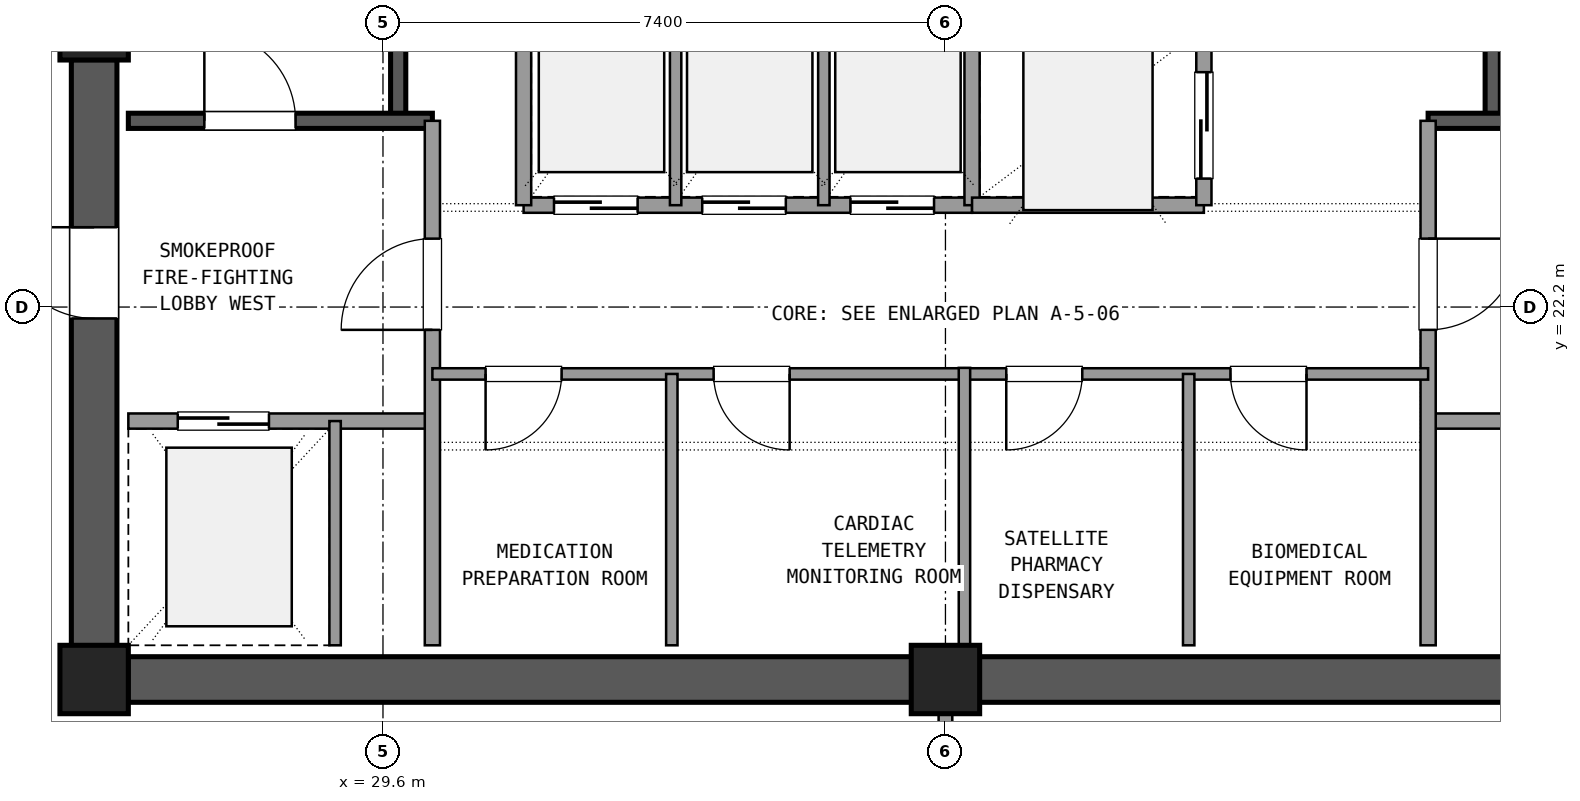
"""IFC4 building model, lengths in metres.
Left out: names, types, materials, properties, quantities, classifications, styles, units other than length and angle.
Written with IfcOpenShell. Run it as: python <this file> out.ifc"""

import sys

from ifc_helpers import new_model, si_unit, direction, frame, frame_2d, origin, origin_2d, place, context, subcontext, project, spatial, rectangle, extrude, element, fill, save


model = new_model("IFC4")
c1 = context("Model", 3, precision=1e-05, world=origin(), true_north=direction((0.0, 1.0)))
c2 = subcontext(c1, "Body", "Model", "MODEL_VIEW")
j1 = project(units=[si_unit("LENGTHUNIT", "METRE"), si_unit("PLANEANGLEUNIT", "RADIAN")], contexts=[c1])
p1 = place(None, origin())
s1 = spatial("IfcSite", under=j1, at=p1, CompositionType="ELEMENT")
p2 = place(p1, origin())
s2 = spatial("IfcBuilding", under=s1, at=p2, CompositionType="ELEMENT")
p3 = place(p2, frame((0.0, 0.0, 199.98)))
s3 = spatial("IfcBuildingStorey", under=s2, at=p3, CompositionType="ELEMENT", Elevation=199.98)
for number, where, z_axis, x_axis in (
    (1, (25.8, 17.3, 0.0), (0.0, 0.0, 1.0), (1.0, 0.0, 0.0)),
    (2, (37.0, 17.3, 0.0), (0.0, 0.0, 1.0), (1.0, 0.0, 0.0)),
    (3, (25.8, 25.9, 0.0), (0.0, 0.0, 1.0), (1.0, 0.0, 0.0)),
):
    element("IfcColumn", number, at=place(p3, frame(where, z_axis=z_axis, x_axis=x_axis)), inside=s3, PredefinedType="COLUMN", context=c2, shape_type="SweptSolid", body=[
        extrude(rectangle(XDim=0.9, YDim=0.9, at=origin_2d()), origin(), (0.0, 0.0, 1.0), 3.6),
    ])
for number, where, z_axis, x_axis in (
    (4, (26.245, 17.3, 0.0), (0.0, 0.0, 1.0), (1.0, 0.0, 0.0)),
    (5, (37.445, 17.3, 0.0), (0.0, 0.0, 1.0), (1.0, 0.0, 0.0)),
):
    element("IfcWall", number, at=place(p3, frame(where, z_axis=z_axis, x_axis=x_axis)), inside=s3, PredefinedType="SHEAR", context=c2, shape_type="SweptSolid", body=[
        extrude(rectangle(XDim=10.31, YDim=0.6, at=frame_2d((5.155, 0.0))), origin(), (0.0, 0.0, 1.0), 3.32),
    ])
p4 = place(p3, frame((25.8, 25.455, 0.0), z_axis=(0.0, 0.0, 1.0), x_axis=(0.0, -1.0, 0.0)))
e6 = element("IfcWall", 6, at=p4, inside=s3, PredefinedType="SHEAR", context=c2, shape_type="SweptSolid", body=[
    extrude(rectangle(XDim=7.71, YDim=0.6, at=frame_2d((3.855, 0.0))), origin(), (0.0, 0.0, 1.0), 3.32),
])
p5 = place(p4, frame((2.205, 0.0, 0.0)))
e7 = element("IfcOpeningElement", 7, at=p5, cuts=e6, PredefinedType="OPENING", context=c2, shape_type="SweptSolid", body=[
    extrude(rectangle(XDim=1.2, YDim=2.15, at=frame_2d((0.6, 1.075))), frame((0.0, 0.31, 0.0), z_axis=(0.0, -1.0, 0.0), x_axis=(1.0, 0.0, 0.0)), (0.0, 0.0, 1.0), 0.62),
])
p6 = place(p3, frame((29.8, 24.65, 0.0), z_axis=(0.0, 0.0, 1.0), x_axis=(0.0, 1.0, 0.0)))
e8 = element("IfcWall", 8, at=p6, inside=s3, PredefinedType="SHEAR", context=c2, shape_type="SweptSolid", body=[
    extrude(rectangle(XDim=9.4, YDim=0.2, at=frame_2d((4.7, 0.0))), origin(), (0.0, 0.0, 1.0), 3.32),
])
p7 = place(p3, frame((26.25, 24.65, 0.0), z_axis=(0.0, 0.0, 1.0), x_axis=(1.0, 0.0, 0.0)))
e9 = element("IfcWall", 9, at=p7, inside=s3, PredefinedType="SHEAR", context=c2, shape_type="SweptSolid", body=[
    extrude(rectangle(XDim=4.0, YDim=0.2, at=frame_2d((2.0, 0.0))), origin(), (0.0, 0.0, 1.0), 3.32),
])
p8 = place(p7, frame((1.0, 0.0, 0.0)))
e10 = element("IfcOpeningElement", 10, at=p8, cuts=e9, PredefinedType="OPENING", context=c2, shape_type="SweptSolid", body=[
    extrude(rectangle(XDim=1.2, YDim=2.15, at=frame_2d((0.6, 1.075))), frame((0.0, 0.11, 0.0), z_axis=(0.0, -1.0, 0.0), x_axis=(1.0, 0.0, 0.0)), (0.0, 0.0, 1.0), 0.22),
])
p9 = place(p3, frame((44.2, 24.65, 0.0), z_axis=(0.0, 0.0, 1.0), x_axis=(0.0, 1.0, 0.0)))
e11 = element("IfcWall", 11, at=p9, inside=s3, PredefinedType="SHEAR", context=c2, shape_type="SweptSolid", body=[
    extrude(rectangle(XDim=9.4, YDim=0.2, at=frame_2d((4.7, 0.0))), origin(), (0.0, 0.0, 1.0), 3.32),
])
p10 = place(p3, frame((43.35, 24.65, 0.0), z_axis=(0.0, 0.0, 1.0), x_axis=(1.0, 0.0, 0.0)))
e12 = element("IfcWall", 12, at=p10, inside=s3, PredefinedType="SHEAR", context=c2, shape_type="SweptSolid", body=[
    extrude(rectangle(XDim=4.4, YDim=0.2, at=frame_2d((2.2, 0.0))), origin(), (0.0, 0.0, 1.0), 3.32),
])
p11 = place(p10, frame((2.0, 0.0, 0.0)))
e13 = element("IfcOpeningElement", 13, at=p11, cuts=e12, PredefinedType="OPENING", context=c2, shape_type="SweptSolid", body=[
    extrude(rectangle(XDim=1.2, YDim=2.15, at=frame_2d((0.6, 1.075))), frame((0.0, 0.11, 0.0), z_axis=(0.0, -1.0, 0.0), x_axis=(1.0, 0.0, 0.0)), (0.0, 0.0, 1.0), 0.22),
])
p12 = place(p3, frame((26.25, 20.7, 0.0), z_axis=(0.0, 0.0, 1.0), x_axis=(1.0, 0.0, 0.0)))
e14 = element("IfcWall", 14, at=p12, inside=s3, PredefinedType="SOLIDWALL", context=c2, shape_type="SweptSolid", body=[
    extrude(rectangle(XDim=4.0, YDim=0.2, at=frame_2d((2.0, 0.0))), origin(), (0.0, 0.0, 1.0), 2.61),
])
p13 = place(p12, frame((0.65, 0.0, 0.0)))
e15 = element("IfcOpeningElement", 15, at=p13, cuts=e14, PredefinedType="OPENING", context=c2, shape_type="SweptSolid", body=[
    extrude(rectangle(XDim=1.2, YDim=2.15, at=frame_2d((0.6, 1.075))), frame((0.0, 0.11, 0.0), z_axis=(0.0, -1.0, 0.0), x_axis=(1.0, 0.0, 0.0)), (0.0, 0.0, 1.0), 0.22),
])
p14 = place(p3, frame((30.25, 17.75, 0.0), z_axis=(0.0, 0.0, 1.0), x_axis=(0.0, 1.0, 0.0)))
e16 = element("IfcWall", 16, at=p14, inside=s3, PredefinedType="SOLIDWALL", context=c2, shape_type="SweptSolid", body=[
    extrude(rectangle(XDim=6.9, YDim=0.2, at=frame_2d((3.45, 0.0))), origin(), (0.0, 0.0, 1.0), 2.61),
])
p15 = place(p14, frame((4.15, 0.0, 0.0)))
e17 = element("IfcOpeningElement", 17, at=p15, cuts=e16, PredefinedType="OPENING", context=c2, shape_type="SweptSolid", body=[
    extrude(rectangle(XDim=1.2, YDim=2.15, at=frame_2d((0.6, 1.075))), frame((0.0, 0.11, 0.0), z_axis=(0.0, -1.0, 0.0), x_axis=(1.0, 0.0, 0.0)), (0.0, 0.0, 1.0), 0.22),
])
p16 = place(p3, frame((28.97, 17.75, 0.0), z_axis=(0.0, 0.0, 1.0), x_axis=(0.0, 1.0, 0.0)))
e18 = element("IfcWall", 18, at=p16, inside=s3, PredefinedType="PARTITIONING", context=c2, shape_type="SweptSolid", body=[
    extrude(rectangle(XDim=2.95, YDim=0.15, at=frame_2d((1.475, 0.0))), origin(), (0.0, 0.0, 1.0), 2.61),
])
p17 = place(p3, frame((43.35, 20.7, 0.0), z_axis=(0.0, 0.0, 1.0), x_axis=(1.0, 0.0, 0.0)))
e19 = element("IfcWall", 19, at=p17, inside=s3, PredefinedType="SOLIDWALL", context=c2, shape_type="SweptSolid", body=[
    extrude(rectangle(XDim=4.4, YDim=0.2, at=frame_2d((2.2, 0.0))), origin(), (0.0, 0.0, 1.0), 2.61),
])
p18 = place(p17, frame((2.35, 0.0, 0.0)))
e20 = element("IfcOpeningElement", 20, at=p18, cuts=e19, PredefinedType="OPENING", context=c2, shape_type="SweptSolid", body=[
    extrude(rectangle(XDim=1.2, YDim=2.15, at=frame_2d((0.6, 1.075))), frame((0.0, 0.11, 0.0), z_axis=(0.0, -1.0, 0.0), x_axis=(1.0, 0.0, 0.0)), (0.0, 0.0, 1.0), 0.22),
])
p19 = place(p3, frame((43.35, 17.75, 0.0), z_axis=(0.0, 0.0, 1.0), x_axis=(0.0, 1.0, 0.0)))
e21 = element("IfcWall", 21, at=p19, inside=s3, PredefinedType="SOLIDWALL", context=c2, shape_type="SweptSolid", body=[
    extrude(rectangle(XDim=6.9, YDim=0.2, at=frame_2d((3.45, 0.0))), origin(), (0.0, 0.0, 1.0), 2.61),
])
p20 = place(p19, frame((4.15, 0.0, 0.0)))
e22 = element("IfcOpeningElement", 22, at=p20, cuts=e21, PredefinedType="OPENING", context=c2, shape_type="SweptSolid", body=[
    extrude(rectangle(XDim=1.2, YDim=2.15, at=frame_2d((0.6, 1.075))), frame((0.0, 0.11, 0.0), z_axis=(0.0, -1.0, 0.0), x_axis=(1.0, 0.0, 0.0)), (0.0, 0.0, 1.0), 0.22),
])
p21 = place(p3, frame((30.25, 21.32, 0.0), z_axis=(0.0, 0.0, 1.0), x_axis=(1.0, 0.0, 0.0)))
e23 = element("IfcWall", 23, at=p21, inside=s3, PredefinedType="PARTITIONING", context=c2, shape_type="SweptSolid", body=[
    extrude(rectangle(XDim=7.0, YDim=0.15, at=frame_2d((3.5, 0.0))), origin(), (0.0, 0.0, 1.0), 2.61),
])
p22 = place(p21, frame((0.7, 0.0, 0.0)))
e24 = element("IfcOpeningElement", 24, at=p22, cuts=e23, PredefinedType="OPENING", context=c2, shape_type="SweptSolid", body=[
    extrude(rectangle(XDim=1.0, YDim=2.15, at=frame_2d((0.5, 1.075))), frame((0.0, 0.085, 0.0), z_axis=(0.0, -1.0, 0.0), x_axis=(1.0, 0.0, 0.0)), (0.0, 0.0, 1.0), 0.17),
])
p23 = place(p21, frame((3.7, 0.0, 0.0)))
e25 = element("IfcOpeningElement", 25, at=p23, cuts=e23, PredefinedType="OPENING", context=c2, shape_type="SweptSolid", body=[
    extrude(rectangle(XDim=1.0, YDim=2.15, at=frame_2d((0.5, 1.075))), frame((0.0, 0.085, 0.0), z_axis=(0.0, -1.0, 0.0), x_axis=(1.0, 0.0, 0.0)), (0.0, 0.0, 1.0), 0.17),
])
p24 = place(p3, frame((33.4, 17.75, 0.0), z_axis=(0.0, 0.0, 1.0), x_axis=(0.0, 1.0, 0.0)))
e26 = element("IfcWall", 26, at=p24, inside=s3, PredefinedType="PARTITIONING", context=c2, shape_type="SweptSolid", body=[
    extrude(rectangle(XDim=3.57, YDim=0.15, at=frame_2d((1.785, 0.0))), origin(), (0.0, 0.0, 1.0), 2.61),
])
p25 = place(p3, frame((37.25, 21.32, 0.0), z_axis=(0.0, 0.0, 1.0), x_axis=(1.0, 0.0, 0.0)))
e27 = element("IfcWall", 27, at=p25, inside=s3, PredefinedType="PARTITIONING", context=c2, shape_type="SweptSolid", body=[
    extrude(rectangle(XDim=6.1, YDim=0.15, at=frame_2d((3.05, 0.0))), origin(), (0.0, 0.0, 1.0), 2.61),
])
p26 = place(p25, frame((0.55, 0.0, 0.0)))
e28 = element("IfcOpeningElement", 28, at=p26, cuts=e27, PredefinedType="OPENING", context=c2, shape_type="SweptSolid", body=[
    extrude(rectangle(XDim=1.0, YDim=2.15, at=frame_2d((0.5, 1.075))), frame((0.0, 0.085, 0.0), z_axis=(0.0, -1.0, 0.0), x_axis=(1.0, 0.0, 0.0)), (0.0, 0.0, 1.0), 0.17),
])
p27 = place(p25, frame((3.5, 0.0, 0.0)))
e29 = element("IfcOpeningElement", 29, at=p27, cuts=e27, PredefinedType="OPENING", context=c2, shape_type="SweptSolid", body=[
    extrude(rectangle(XDim=1.0, YDim=2.15, at=frame_2d((0.5, 1.075))), frame((0.0, 0.085, 0.0), z_axis=(0.0, -1.0, 0.0), x_axis=(1.0, 0.0, 0.0)), (0.0, 0.0, 1.0), 0.17),
])
p28 = place(p3, frame((40.2, 17.75, 0.0), z_axis=(0.0, 0.0, 1.0), x_axis=(0.0, 1.0, 0.0)))
e30 = element("IfcWall", 30, at=p28, inside=s3, PredefinedType="PARTITIONING", context=c2, shape_type="SweptSolid", body=[
    extrude(rectangle(XDim=3.57, YDim=0.15, at=frame_2d((1.785, 0.0))), origin(), (0.0, 0.0, 1.0), 2.61),
])
p29 = place(p3, frame((37.25, 17.75, 0.0), z_axis=(0.0, 0.0, 1.0), x_axis=(0.0, 1.0, 0.0)))
e31 = element("IfcWall", 31, at=p29, inside=s3, PredefinedType="PARTITIONING", context=c2, shape_type="SweptSolid", body=[
    extrude(rectangle(XDim=3.65, YDim=0.15, at=frame_2d((1.825, 0.0))), origin(), (0.0, 0.0, 1.0), 2.61),
])
p30 = place(p3, frame((31.45, 23.54, 0.0), z_axis=(0.0, 0.0, 1.0), x_axis=(1.0, 0.0, 0.0)))
e32 = element("IfcWall", 32, at=p30, inside=s3, PredefinedType="SOLIDWALL", context=c2, shape_type="SweptSolid", body=[
    extrude(rectangle(XDim=5.9, YDim=0.2, at=frame_2d((2.95, 0.0))), origin(), (0.0, 0.0, 1.0), 2.61),
])
p31 = place(p30, frame((0.4, 0.0, 0.0)))
e33 = element("IfcOpeningElement", 33, at=p31, cuts=e32, PredefinedType="OPENING", context=c2, shape_type="SweptSolid", body=[
    extrude(rectangle(XDim=1.1, YDim=2.15, at=frame_2d((0.55, 1.075))), frame((0.0, 0.11, 0.0), z_axis=(0.0, -1.0, 0.0), x_axis=(1.0, 0.0, 0.0)), (0.0, 0.0, 1.0), 0.22),
])
p32 = place(p30, frame((2.35, 0.0, 0.0)))
e34 = element("IfcOpeningElement", 34, at=p32, cuts=e32, PredefinedType="OPENING", context=c2, shape_type="SweptSolid", body=[
    extrude(rectangle(XDim=1.1, YDim=2.15, at=frame_2d((0.55, 1.075))), frame((0.0, 0.11, 0.0), z_axis=(0.0, -1.0, 0.0), x_axis=(1.0, 0.0, 0.0)), (0.0, 0.0, 1.0), 0.22),
])
p33 = place(p30, frame((4.3, 0.0, 0.0)))
e35 = element("IfcOpeningElement", 35, at=p33, cuts=e32, PredefinedType="OPENING", context=c2, shape_type="SweptSolid", body=[
    extrude(rectangle(XDim=1.1, YDim=2.15, at=frame_2d((0.55, 1.075))), frame((0.0, 0.11, 0.0), z_axis=(0.0, -1.0, 0.0), x_axis=(1.0, 0.0, 0.0)), (0.0, 0.0, 1.0), 0.22),
])
p34 = place(p3, frame((31.45, 23.54, 0.0), z_axis=(0.0, 0.0, 1.0), x_axis=(0.0, 1.0, 0.0)))
e36 = element("IfcWall", 36, at=p34, inside=s3, PredefinedType="SOLIDWALL", context=c2, shape_type="SweptSolid", body=[
    extrude(rectangle(XDim=2.81, YDim=0.2, at=frame_2d((1.405, 0.0))), origin(), (0.0, 0.0, 1.0), 2.61),
])
for number, where, z_axis, x_axis in (
    (37, (33.45, 23.54, 0.0), (0.0, 0.0, 1.0), (0.0, 1.0, 0.0)),
    (38, (35.4, 23.54, 0.0), (0.0, 0.0, 1.0), (0.0, 1.0, 0.0)),
):
    element("IfcWall", number, at=place(p3, frame(where, z_axis=z_axis, x_axis=x_axis)), inside=s3, PredefinedType="PARTITIONING", context=c2, shape_type="SweptSolid", body=[
        extrude(rectangle(XDim=2.81, YDim=0.15, at=frame_2d((1.405, 0.0))), origin(), (0.0, 0.0, 1.0), 2.61),
    ])
p35 = place(p3, frame((37.35, 23.54, 0.0), z_axis=(0.0, 0.0, 1.0), x_axis=(0.0, 1.0, 0.0)))
e39 = element("IfcWall", 39, at=p35, inside=s3, PredefinedType="SOLIDWALL", context=c2, shape_type="SweptSolid", body=[
    extrude(rectangle(XDim=6.82, YDim=0.2, at=frame_2d((3.41, 0.0))), origin(), (0.0, 0.0, 1.0), 2.61),
])
p36 = place(p3, frame((37.35, 23.54, 0.0), z_axis=(0.0, 0.0, 1.0), x_axis=(1.0, 0.0, 0.0)))
e40 = element("IfcWall", 40, at=p36, inside=s3, PredefinedType="SOLIDWALL", context=c2, shape_type="SweptSolid", body=[
    extrude(rectangle(XDim=3.05, YDim=0.2, at=frame_2d((1.525, 0.0))), origin(), (0.0, 0.0, 1.0), 2.61),
])
p37 = place(p3, frame((40.4, 23.54, 0.0), z_axis=(0.0, 0.0, 1.0), x_axis=(0.0, 1.0, 0.0)))
e41 = element("IfcWall", 41, at=p37, inside=s3, PredefinedType="SOLIDWALL", context=c2, shape_type="SweptSolid", body=[
    extrude(rectangle(XDim=6.82, YDim=0.2, at=frame_2d((3.41, 0.0))), origin(), (0.0, 0.0, 1.0), 2.61),
])
p38 = place(p37, frame((0.35, 0.0, 0.0)))
e42 = element("IfcOpeningElement", 42, at=p38, cuts=e41, PredefinedType="OPENING", context=c2, shape_type="SweptSolid", body=[
    extrude(rectangle(XDim=1.4, YDim=2.2, at=frame_2d((0.7, 1.1))), frame((0.0, 0.11, 0.0), z_axis=(0.0, -1.0, 0.0), x_axis=(1.0, 0.0, 0.0)), (0.0, 0.0, 1.0), 0.22),
])
p39 = place(p37, frame((2.65, 0.0, 0.0)))
e43 = element("IfcOpeningElement", 43, at=p39, cuts=e41, PredefinedType="OPENING", context=c2, shape_type="SweptSolid", body=[
    extrude(rectangle(XDim=1.4, YDim=2.2, at=frame_2d((0.7, 1.1))), frame((0.0, 0.11, 0.0), z_axis=(0.0, -1.0, 0.0), x_axis=(1.0, 0.0, 0.0)), (0.0, 0.0, 1.0), 0.22),
])
p40 = place(p37, frame((4.85, 0.0, 0.0)))
e44 = element("IfcOpeningElement", 44, at=p40, cuts=e41, PredefinedType="OPENING", context=c2, shape_type="SweptSolid", body=[
    extrude(rectangle(XDim=1.4, YDim=2.2, at=frame_2d((0.7, 1.1))), frame((0.0, 0.11, 0.0), z_axis=(0.0, -1.0, 0.0), x_axis=(1.0, 0.0, 0.0)), (0.0, 0.0, 1.0), 0.22),
])
p41 = place(p3, frame((37.0, 14.15, 0.0), z_axis=(0.0, 0.0, 1.0), x_axis=(0.0, 1.0, 0.0)))
e45 = element("IfcWall", 45, at=p41, inside=s3, PredefinedType="PARTITIONING", context=c2, shape_type="SweptSolid", body=[
    extrude(rectangle(XDim=2.7, YDim=0.18, at=frame_2d((1.35, 0.0))), origin(), (0.0, 0.0, 1.0), 2.61),
])
p42 = place(p41, frame((0.35, 0.0, 0.0)))
e46 = element("IfcOpeningElement", 46, at=p42, cuts=e45, PredefinedType="OPENING", context=c2, shape_type="SweptSolid", body=[
    extrude(rectangle(XDim=2.0, YDim=2.2, at=frame_2d((1.0, 1.1))), frame((0.0, 0.1, 0.0), z_axis=(0.0, -1.0, 0.0), x_axis=(1.0, 0.0, 0.0)), (0.0, 0.0, 1.0), 0.2),
])
p43 = place(p8, origin())
e47 = element("IfcDoor", 47, at=p43, inside=s3, OperationType="SINGLE_SWING_LEFT", PredefinedType="DOOR", context=c2, shape_type="SweptSolid", body=[
    extrude(rectangle(XDim=1.2, YDim=2.15, at=frame_2d((0.6, 1.075))), frame((0.0, 0.025, 0.0), z_axis=(0.0, -1.0, 0.0), x_axis=(1.0, 0.0, 0.0)), (0.0, 0.0, 1.0), 0.05),
])
fill(e10, e47)
p44 = place(p13, origin())
e48 = element("IfcDoor", 48, at=p44, inside=s3, OperationType="SLIDING_TO_LEFT", PredefinedType="DOOR", context=c2, shape_type="SweptSolid", body=[
    extrude(rectangle(XDim=1.2, YDim=2.15, at=frame_2d((0.6, 1.075))), frame((0.0, 0.025, 0.0), z_axis=(0.0, -1.0, 0.0), x_axis=(1.0, 0.0, 0.0)), (0.0, 0.0, 1.0), 0.05),
])
fill(e15, e48)
p45 = place(p15, origin())
e49 = element("IfcDoor", 49, at=p45, inside=s3, OperationType="SINGLE_SWING_LEFT", PredefinedType="DOOR", context=c2, shape_type="SweptSolid", body=[
    extrude(rectangle(XDim=1.2, YDim=2.15, at=frame_2d((0.6, 1.075))), frame((0.0, 0.025, 0.0), z_axis=(0.0, -1.0, 0.0), x_axis=(1.0, 0.0, 0.0)), (0.0, 0.0, 1.0), 0.05),
])
fill(e17, e49)
p46 = place(p20, frame((1.2, 0.0, 0.0), z_axis=(0.0, 0.0, 1.0), x_axis=(-1.0, 0.0, 0.0)))
e50 = element("IfcDoor", 50, at=p46, inside=s3, OperationType="SINGLE_SWING_RIGHT", PredefinedType="DOOR", context=c2, shape_type="SweptSolid", body=[
    extrude(rectangle(XDim=1.2, YDim=2.15, at=frame_2d((0.6, 1.075))), frame((0.0, 0.025, 0.0), z_axis=(0.0, -1.0, 0.0), x_axis=(1.0, 0.0, 0.0)), (0.0, 0.0, 1.0), 0.05),
])
fill(e22, e50)
p47 = place(p5, frame((1.2, 0.0, 0.0), z_axis=(0.0, 0.0, 1.0), x_axis=(-1.0, 0.0, 0.0)))
e51 = element("IfcDoor", 51, at=p47, inside=s3, OperationType="SINGLE_SWING_LEFT", PredefinedType="DOOR", context=c2, shape_type="SweptSolid", body=[
    extrude(rectangle(XDim=1.2, YDim=2.15, at=frame_2d((0.6, 1.075))), frame((0.0, 0.025, 0.0), z_axis=(0.0, -1.0, 0.0), x_axis=(1.0, 0.0, 0.0)), (0.0, 0.0, 1.0), 0.05),
])
fill(e7, e51)
p48 = place(p22, frame((1.0, 0.0, 0.0), z_axis=(0.0, 0.0, 1.0), x_axis=(-1.0, 0.0, 0.0)))
e52 = element("IfcDoor", 52, at=p48, inside=s3, OperationType="SINGLE_SWING_LEFT", PredefinedType="DOOR", context=c2, shape_type="SweptSolid", body=[
    extrude(rectangle(XDim=1.0, YDim=2.15, at=frame_2d((0.5, 1.075))), frame((0.0, 0.025, 0.0), z_axis=(0.0, -1.0, 0.0), x_axis=(1.0, 0.0, 0.0)), (0.0, 0.0, 1.0), 0.05),
])
fill(e24, e52)
p49 = place(p23, frame((1.0, 0.0, 0.0), z_axis=(0.0, 0.0, 1.0), x_axis=(-1.0, 0.0, 0.0)))
e53 = element("IfcDoor", 53, at=p49, inside=s3, OperationType="SINGLE_SWING_RIGHT", PredefinedType="DOOR", context=c2, shape_type="SweptSolid", body=[
    extrude(rectangle(XDim=1.0, YDim=2.15, at=frame_2d((0.5, 1.075))), frame((0.0, 0.025, 0.0), z_axis=(0.0, -1.0, 0.0), x_axis=(1.0, 0.0, 0.0)), (0.0, 0.0, 1.0), 0.05),
])
fill(e25, e53)
p50 = place(p26, frame((1.0, 0.0, 0.0), z_axis=(0.0, 0.0, 1.0), x_axis=(-1.0, 0.0, 0.0)))
e54 = element("IfcDoor", 54, at=p50, inside=s3, OperationType="SINGLE_SWING_LEFT", PredefinedType="DOOR", context=c2, shape_type="SweptSolid", body=[
    extrude(rectangle(XDim=1.0, YDim=2.15, at=frame_2d((0.5, 1.075))), frame((0.0, 0.025, 0.0), z_axis=(0.0, -1.0, 0.0), x_axis=(1.0, 0.0, 0.0)), (0.0, 0.0, 1.0), 0.05),
])
fill(e28, e54)
p51 = place(p27, frame((1.0, 0.0, 0.0), z_axis=(0.0, 0.0, 1.0), x_axis=(-1.0, 0.0, 0.0)))
e55 = element("IfcDoor", 55, at=p51, inside=s3, OperationType="SINGLE_SWING_RIGHT", PredefinedType="DOOR", context=c2, shape_type="SweptSolid", body=[
    extrude(rectangle(XDim=1.0, YDim=2.15, at=frame_2d((0.5, 1.075))), frame((0.0, 0.025, 0.0), z_axis=(0.0, -1.0, 0.0), x_axis=(1.0, 0.0, 0.0)), (0.0, 0.0, 1.0), 0.05),
])
fill(e29, e55)
p52 = place(p31, origin())
e56 = element("IfcDoor", 56, at=p52, inside=s3, OperationType="SLIDING_TO_RIGHT", PredefinedType="DOOR", context=c2, shape_type="SweptSolid", body=[
    extrude(rectangle(XDim=1.1, YDim=2.15, at=frame_2d((0.55, 1.075))), frame((0.0, 0.025, 0.0), z_axis=(0.0, -1.0, 0.0), x_axis=(1.0, 0.0, 0.0)), (0.0, 0.0, 1.0), 0.05),
])
fill(e33, e56)
p53 = place(p32, origin())
e57 = element("IfcDoor", 57, at=p53, inside=s3, OperationType="SLIDING_TO_RIGHT", PredefinedType="DOOR", context=c2, shape_type="SweptSolid", body=[
    extrude(rectangle(XDim=1.1, YDim=2.15, at=frame_2d((0.55, 1.075))), frame((0.0, 0.025, 0.0), z_axis=(0.0, -1.0, 0.0), x_axis=(1.0, 0.0, 0.0)), (0.0, 0.0, 1.0), 0.05),
])
fill(e34, e57)
p54 = place(p33, origin())
e58 = element("IfcDoor", 58, at=p54, inside=s3, OperationType="SLIDING_TO_RIGHT", PredefinedType="DOOR", context=c2, shape_type="SweptSolid", body=[
    extrude(rectangle(XDim=1.1, YDim=2.15, at=frame_2d((0.55, 1.075))), frame((0.0, 0.025, 0.0), z_axis=(0.0, -1.0, 0.0), x_axis=(1.0, 0.0, 0.0)), (0.0, 0.0, 1.0), 0.05),
])
fill(e35, e58)
p55 = place(p38, origin())
e59 = element("IfcDoor", 59, at=p55, inside=s3, OperationType="SLIDING_TO_LEFT", PredefinedType="DOOR", context=c2, shape_type="SweptSolid", body=[
    extrude(rectangle(XDim=1.4, YDim=2.2, at=frame_2d((0.7, 1.1))), frame((0.0, 0.025, 0.0), z_axis=(0.0, -1.0, 0.0), x_axis=(1.0, 0.0, 0.0)), (0.0, 0.0, 1.0), 0.05),
])
fill(e42, e59)
save(model, sys.argv[1])
